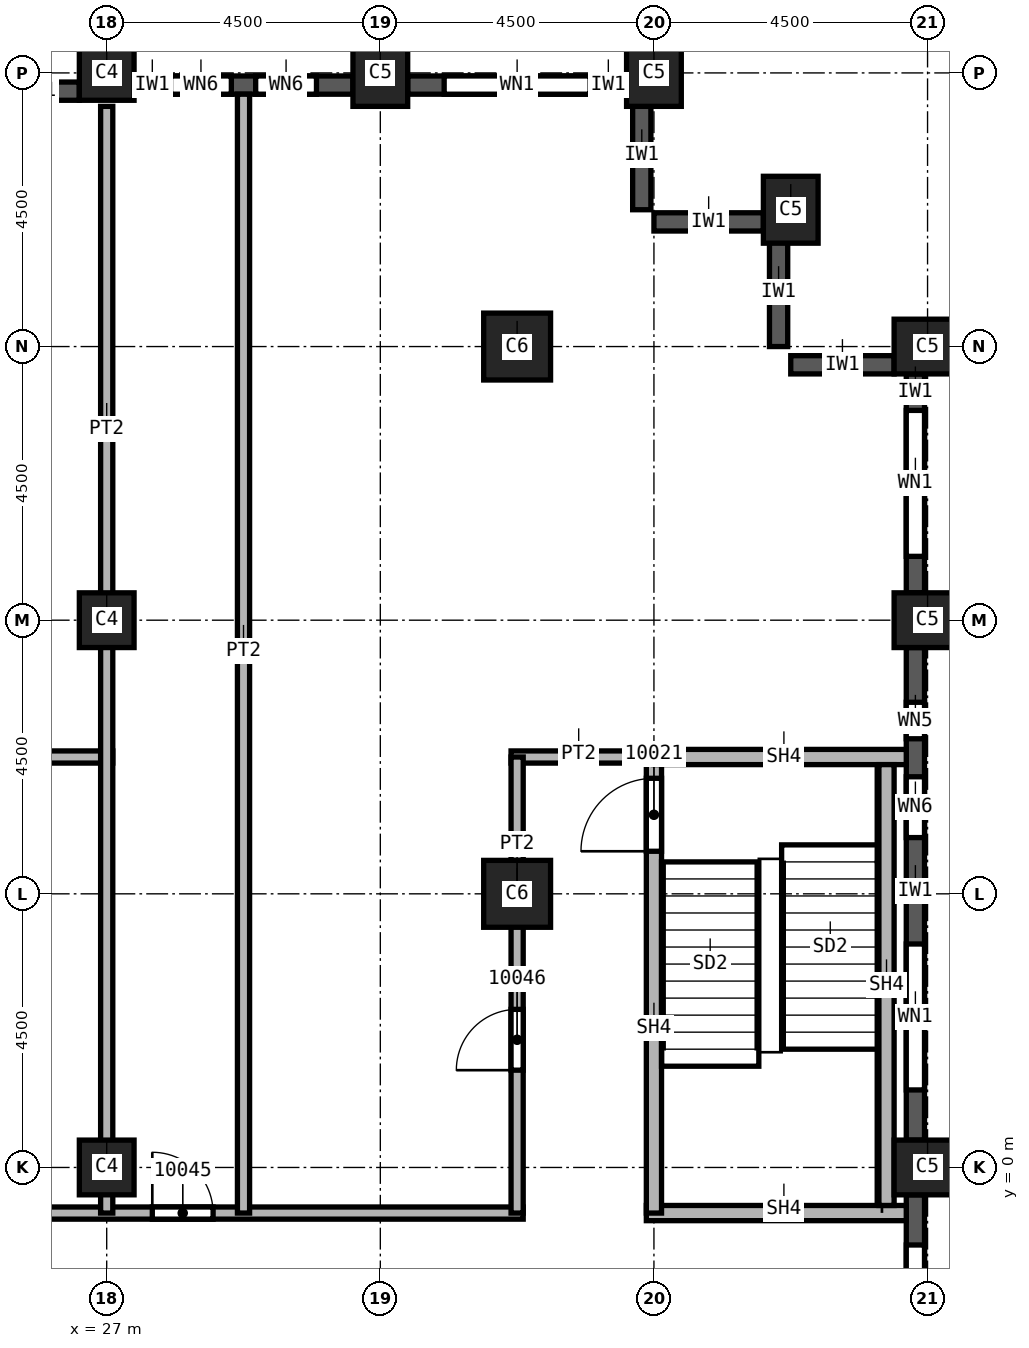
"""IFC4 building model, lengths in metres.
Left out: names, types, materials, properties, quantities, classifications, styles, units other than length and angle.
Written with IfcOpenShell. Run it as: python <this file> out.ifc"""

import sys

from ifc_helpers import new_model, si_unit, direction, frame, frame_2d, origin, origin_2d, place, context, subcontext, project, spatial, rectangle, extrude, element, fill, save


model = new_model("IFC4")
c1 = context("Model", 3, precision=1e-05, world=origin(), true_north=direction((0.0, 1.0)))
c2 = subcontext(c1, "Body", "Model", "MODEL_VIEW")
j1 = project(units=[si_unit("LENGTHUNIT", "METRE"), si_unit("PLANEANGLEUNIT", "RADIAN")], contexts=[c1])
p1 = place(None, origin())
s1 = spatial("IfcSite", under=j1, at=p1, CompositionType="ELEMENT")
p2 = place(p1, origin())
s2 = spatial("IfcBuilding", under=s1, at=p2, CompositionType="ELEMENT")
p3 = place(p2, frame((0.0, 0.0, 174.0)))
s3 = spatial("IfcBuildingStorey", under=s2, at=p3, CompositionType="ELEMENT", Elevation=174.0)
for number, where, z_axis, x_axis in (
    (1, (40.5, 0.0, 0.0), (0.0, 0.0, 1.0), (0.0, 1.0, 0.0)),
    (2, (40.5, 9.0, 0.0), (0.0, 0.0, 1.0), (0.0, 1.0, 0.0)),
    (3, (40.5, 13.5, 0.0), (0.0, 0.0, 1.0), (0.0, 1.0, 0.0)),
    (4, (38.25, 15.75, 0.0), (0.0, 0.0, 1.0), (1.0, 0.0, 0.0)),
    (5, (31.5, 18.0, 0.0), (0.0, 0.0, 1.0), (1.0, 0.0, 0.0)),
    (6, (36.0, 18.0, 0.0), (0.0, 0.0, 1.0), (1.0, 0.0, 0.0)),
):
    element("IfcColumn", number, at=place(p3, frame(where, z_axis=z_axis, x_axis=x_axis)), inside=s3, PredefinedType="COLUMN", context=c2, shape_type="SweptSolid", body=[
        extrude(rectangle(XDim=0.9, YDim=1.1, at=origin_2d()), origin(), (0.0, 0.0, 1.0), 3.59),
    ])
for number, where, z_axis, x_axis in (
    (7, (33.75, 4.5, 0.0), (0.0, 0.0, 1.0), (1.0, 0.0, 0.0)),
    (8, (33.75, 13.5, 0.0), (0.0, 0.0, 1.0), (1.0, 0.0, 0.0)),
):
    element("IfcColumn", number, at=place(p3, frame(where, z_axis=z_axis, x_axis=x_axis)), inside=s3, PredefinedType="COLUMN", context=c2, shape_type="SweptSolid", body=[
        extrude(rectangle(XDim=1.1, YDim=1.1, at=origin_2d()), origin(), (0.0, 0.0, 1.0), 3.59),
    ])
for number, where, z_axis, x_axis in (
    (9, (27.0, 0.0, 0.0), (0.0, 0.0, 1.0), (1.0, 0.0, 0.0)),
    (10, (27.0, 9.0, 0.0), (0.0, 0.0, 1.0), (1.0, 0.0, 0.0)),
    (11, (27.0, 18.0, 0.0), (0.0, 0.0, 1.0), (1.0, 0.0, 0.0)),
):
    element("IfcColumn", number, at=place(p3, frame(where, z_axis=z_axis, x_axis=x_axis)), inside=s3, PredefinedType="COLUMN", context=c2, shape_type="SweptSolid", body=[
        extrude(rectangle(XDim=0.9, YDim=0.9, at=origin_2d()), origin(), (0.0, 0.0, 1.0), 3.59),
    ])
p4 = place(p3, frame((39.95, 13.2, 0.0), z_axis=(0.0, 0.0, 1.0), x_axis=(-1.0, 0.0, 0.0)))
e12 = element("IfcWall", 12, at=p4, inside=s3, PredefinedType="SOLIDWALL", context=c2, shape_type="SweptSolid", body=[
    extrude(rectangle(XDim=1.7, YDim=0.3, at=frame_2d((0.85, 0.0))), origin(), (0.0, 0.0, 1.0), 2.99),
])
for number, where, z_axis, x_axis in (
    (13, (38.05, 15.3, 0.0), (0.0, 0.0, 1.0), (0.0, -1.0, 0.0)),
    (14, (37.8, 15.55, 0.0), (0.0, 0.0, 1.0), (-1.0, 0.0, 0.0)),
    (15, (35.8, 17.55, 0.0), (0.0, 0.0, 1.0), (0.0, -1.0, 0.0)),
):
    element("IfcWall", number, at=place(p3, frame(where, z_axis=z_axis, x_axis=x_axis)), inside=s3, PredefinedType="SOLIDWALL", context=c2, shape_type="SweptSolid", body=[
        extrude(rectangle(XDim=1.8, YDim=0.3, at=frame_2d((0.9, 0.0))), origin(), (0.0, 0.0, 1.0), 2.99),
    ])
p5 = place(p3, frame((40.3, -8.55, 0.0), z_axis=(0.0, 0.0, 1.0), x_axis=(0.0, 1.0, 0.0)))
e16 = element("IfcWall", 16, at=p5, inside=s3, PredefinedType="SOLIDWALL", context=c2, shape_type="SweptSolid", body=[
    extrude(rectangle(XDim=8.1, YDim=0.3, at=frame_2d((4.05, 0.0))), origin(), (0.0, 0.0, 1.0), 2.99),
])
p6 = place(p5, frame((0.825, 0.0, 0.8)))
e17 = element("IfcOpeningElement", 17, at=p6, cuts=e16, PredefinedType="OPENING", context=c2, shape_type="SweptSolid", body=[
    extrude(rectangle(XDim=2.4, YDim=1.95, at=frame_2d((1.2, 0.975))), frame((0.0, 0.15, 0.0), z_axis=(0.0, -1.0, 0.0), x_axis=(1.0, 0.0, 0.0)), (0.0, 0.0, 1.0), 0.3),
])
p7 = place(p5, frame((4.875, 0.0, 0.8)))
e18 = element("IfcOpeningElement", 18, at=p7, cuts=e16, PredefinedType="OPENING", context=c2, shape_type="SweptSolid", body=[
    extrude(rectangle(XDim=2.4, YDim=1.95, at=frame_2d((1.2, 0.975))), frame((0.0, 0.15, 0.0), z_axis=(0.0, -1.0, 0.0), x_axis=(1.0, 0.0, 0.0)), (0.0, 0.0, 1.0), 0.3),
])
p8 = place(p3, frame((40.3, 0.45, 0.0), z_axis=(0.0, 0.0, 1.0), x_axis=(0.0, 1.0, 0.0)))
e19 = element("IfcWall", 19, at=p8, inside=s3, PredefinedType="SOLIDWALL", context=c2, shape_type="SweptSolid", body=[
    extrude(rectangle(XDim=8.1, YDim=0.3, at=frame_2d((4.05, 0.0))), origin(), (0.0, 0.0, 1.0), 2.99),
])
p9 = place(p8, frame((0.825, 0.0, 0.8)))
e20 = element("IfcOpeningElement", 20, at=p9, cuts=e19, PredefinedType="OPENING", context=c2, shape_type="SweptSolid", body=[
    extrude(rectangle(XDim=2.4, YDim=1.95, at=frame_2d((1.2, 0.975))), frame((0.0, 0.15, 0.0), z_axis=(0.0, -1.0, 0.0), x_axis=(1.0, 0.0, 0.0)), (0.0, 0.0, 1.0), 0.3),
])
p10 = place(p8, frame((4.975, 0.0, 0.8)))
e21 = element("IfcOpeningElement", 21, at=p10, cuts=e19, PredefinedType="OPENING", context=c2, shape_type="SweptSolid", body=[
    extrude(rectangle(XDim=1.0, YDim=1.95, at=frame_2d((0.5, 0.975))), frame((0.0, 0.15, 0.0), z_axis=(0.0, -1.0, 0.0), x_axis=(1.0, 0.0, 0.0)), (0.0, 0.0, 1.0), 0.3),
])
p11 = place(p8, frame((6.6, 0.0, 0.8)))
e22 = element("IfcOpeningElement", 22, at=p11, cuts=e19, PredefinedType="OPENING", context=c2, shape_type="SweptSolid", body=[
    extrude(rectangle(XDim=0.6, YDim=1.95, at=frame_2d((0.3, 0.975))), frame((0.0, 0.15, 0.0), z_axis=(0.0, -1.0, 0.0), x_axis=(1.0, 0.0, 0.0)), (0.0, 0.0, 1.0), 0.3),
])
p12 = place(p3, frame((40.3, 9.45, 0.0), z_axis=(0.0, 0.0, 1.0), x_axis=(0.0, 1.0, 0.0)))
e23 = element("IfcWall", 23, at=p12, inside=s3, PredefinedType="SOLIDWALL", context=c2, shape_type="SweptSolid", body=[
    extrude(rectangle(XDim=3.6, YDim=0.3, at=frame_2d((1.8, 0.0))), origin(), (0.0, 0.0, 1.0), 2.99),
])
p13 = place(p12, frame((0.6, 0.0, 0.8)))
e24 = element("IfcOpeningElement", 24, at=p13, cuts=e23, PredefinedType="OPENING", context=c2, shape_type="SweptSolid", body=[
    extrude(rectangle(XDim=2.4, YDim=1.95, at=frame_2d((1.2, 0.975))), frame((0.0, 0.15, 0.0), z_axis=(0.0, -1.0, 0.0), x_axis=(1.0, 0.0, 0.0)), (0.0, 0.0, 1.0), 0.3),
])
p14 = place(p3, frame((35.55, 17.8, 0.0), z_axis=(0.0, 0.0, 1.0), x_axis=(-1.0, 0.0, 0.0)))
e25 = element("IfcWall", 25, at=p14, inside=s3, PredefinedType="SOLIDWALL", context=c2, shape_type="SweptSolid", body=[
    extrude(rectangle(XDim=3.6, YDim=0.3, at=frame_2d((1.8, 0.0))), origin(), (0.0, 0.0, 1.0), 2.99),
])
p15 = place(p14, frame((0.6, 0.0, 0.8)))
e26 = element("IfcOpeningElement", 26, at=p15, cuts=e25, PredefinedType="OPENING", context=c2, shape_type="SweptSolid", body=[
    extrude(rectangle(XDim=2.4, YDim=1.95, at=frame_2d((1.2, 0.975))), frame((0.0, 0.15, 0.0), z_axis=(0.0, -1.0, 0.0), x_axis=(1.0, 0.0, 0.0)), (0.0, 0.0, 1.0), 0.3),
])
p16 = place(p3, frame((31.05, 17.8, 0.0), z_axis=(0.0, 0.0, 1.0), x_axis=(-1.0, 0.0, 0.0)))
e27 = element("IfcWall", 27, at=p16, inside=s3, PredefinedType="SOLIDWALL", context=c2, shape_type="SweptSolid", body=[
    extrude(rectangle(XDim=3.6, YDim=0.3, at=frame_2d((1.8, 0.0))), origin(), (0.0, 0.0, 1.0), 2.99),
])
p17 = place(p16, frame((0.6, 0.0, 0.8)))
e28 = element("IfcOpeningElement", 28, at=p17, cuts=e27, PredefinedType="OPENING", context=c2, shape_type="SweptSolid", body=[
    extrude(rectangle(XDim=1.0, YDim=1.95, at=frame_2d((0.5, 0.975))), frame((0.0, 0.15, 0.0), z_axis=(0.0, -1.0, 0.0), x_axis=(1.0, 0.0, 0.0)), (0.0, 0.0, 1.0), 0.3),
])
p18 = place(p16, frame((2.0, 0.0, 0.8)))
e29 = element("IfcOpeningElement", 29, at=p18, cuts=e27, PredefinedType="OPENING", context=c2, shape_type="SweptSolid", body=[
    extrude(rectangle(XDim=1.0, YDim=1.95, at=frame_2d((0.5, 0.975))), frame((0.0, 0.15, 0.0), z_axis=(0.0, -1.0, 0.0), x_axis=(1.0, 0.0, 0.0)), (0.0, 0.0, 1.0), 0.3),
])
p19 = place(p3, frame((26.55, 17.7, 0.0), z_axis=(0.0, 0.0, 1.0), x_axis=(-1.0, 0.0, 0.0)))
e30 = element("IfcWall", 30, at=p19, inside=s3, PredefinedType="SOLIDWALL", context=c2, shape_type="SweptSolid", body=[
    extrude(rectangle(XDim=1.35, YDim=0.3, at=frame_2d((0.675, 0.0))), origin(), (0.0, 0.0, 1.0), 2.99),
])
p20 = place(p3, frame((15.4, -0.75, 0.0), z_axis=(0.0, 0.0, 1.0), x_axis=(1.0, 0.0, 0.0)))
e31 = element("IfcWall", 31, at=p20, inside=s3, PredefinedType="PARTITIONING", context=c2, shape_type="SweptSolid", body=[
    extrude(rectangle(XDim=18.45, YDim=0.2, at=frame_2d((9.225, 0.0))), origin(), (0.0, 0.0, 1.0), 3.59),
])
p21 = place(p20, frame((2.65, 0.0, 0.0)))
e32 = element("IfcOpeningElement", 32, at=p21, cuts=e31, PredefinedType="OPENING", context=c2, shape_type="SweptSolid", body=[
    extrude(rectangle(XDim=1.0, YDim=2.1, at=frame_2d((0.5, 1.05))), frame((0.0, 0.1, 0.0), z_axis=(0.0, -1.0, 0.0), x_axis=(1.0, 0.0, 0.0)), (0.0, 0.0, 1.0), 0.2),
])
p22 = place(p20, frame((12.35, 0.0, 0.0)))
e33 = element("IfcOpeningElement", 33, at=p22, cuts=e31, PredefinedType="OPENING", context=c2, shape_type="SweptSolid", body=[
    extrude(rectangle(XDim=1.0, YDim=2.1, at=frame_2d((0.5, 1.05))), frame((0.0, 0.1, 0.0), z_axis=(0.0, -1.0, 0.0), x_axis=(1.0, 0.0, 0.0)), (0.0, 0.0, 1.0), 0.2),
])
p23 = place(p3, frame((15.4, 6.75, 0.0), z_axis=(0.0, 0.0, 1.0), x_axis=(1.0, 0.0, 0.0)))
e34 = element("IfcWall", 34, at=p23, inside=s3, PredefinedType="PARTITIONING", context=c2, shape_type="SweptSolid", body=[
    extrude(rectangle(XDim=11.7, YDim=0.2, at=frame_2d((5.85, 0.0))), origin(), (0.0, 0.0, 1.0), 3.59),
])
p24 = place(p3, frame((27.0, 17.45, 0.0), z_axis=(0.0, 0.0, 1.0), x_axis=(0.0, -1.0, 0.0)))
e35 = element("IfcWall", 35, at=p24, inside=s3, PredefinedType="PARTITIONING", context=c2, shape_type="SweptSolid", body=[
    extrude(rectangle(XDim=18.2, YDim=0.2, at=frame_2d((9.1, 0.0))), origin(), (0.0, 0.0, 1.0), 3.59),
])
p25 = place(p3, frame((29.25, 17.65, 0.0), z_axis=(0.0, 0.0, 1.0), x_axis=(0.0, -1.0, 0.0)))
e36 = element("IfcWall", 36, at=p25, inside=s3, PredefinedType="PARTITIONING", context=c2, shape_type="SweptSolid", body=[
    extrude(rectangle(XDim=18.4, YDim=0.2, at=frame_2d((9.2, 0.0))), origin(), (0.0, 0.0, 1.0), 3.59),
])
p26 = place(p3, frame((33.65, 6.75, 0.0), z_axis=(0.0, 0.0, 1.0), x_axis=(1.0, 0.0, 0.0)))
e37 = element("IfcWall", 37, at=p26, inside=s3, PredefinedType="PARTITIONING", context=c2, shape_type="SweptSolid", body=[
    extrude(rectangle(XDim=2.35, YDim=0.2, at=frame_2d((1.175, 0.0))), origin(), (0.0, 0.0, 1.0), 3.59),
])
p27 = place(p3, frame((33.75, -0.75, 0.0), z_axis=(0.0, 0.0, 1.0), x_axis=(0.0, 1.0, 0.0)))
e38 = element("IfcWall", 38, at=p27, inside=s3, PredefinedType="PARTITIONING", context=c2, shape_type="SweptSolid", body=[
    extrude(rectangle(XDim=7.5, YDim=0.2, at=frame_2d((3.75, 0.0))), origin(), (0.0, 0.0, 1.0), 3.59),
])
p28 = place(p27, frame((2.35, 0.0, 0.0)))
e39 = element("IfcOpeningElement", 39, at=p28, cuts=e38, PredefinedType="OPENING", context=c2, shape_type="SweptSolid", body=[
    extrude(rectangle(XDim=1.0, YDim=2.1, at=frame_2d((0.5, 1.05))), frame((0.0, 0.1, 0.0), z_axis=(0.0, -1.0, 0.0), x_axis=(1.0, 0.0, 0.0)), (0.0, 0.0, 1.0), 0.2),
])
p29 = place(p3, frame((35.875, -0.75, 0.0), z_axis=(0.0, 0.0, 1.0), x_axis=(1.0, 0.0, 0.0)))
e40 = element("IfcWall", 40, at=p29, inside=s3, PredefinedType="SOLIDWALL", context=c2, shape_type="SweptSolid", body=[
    extrude(rectangle(XDim=4.275, YDim=0.25, at=frame_2d((2.137, 0.0))), origin(), (0.0, 0.0, 1.0), 3.59),
])
p30 = place(p3, frame((36.0, -0.75, 0.0), z_axis=(0.0, 0.0, 1.0), x_axis=(0.0, 1.0, 0.0)))
e41 = element("IfcWall", 41, at=p30, inside=s3, PredefinedType="SOLIDWALL", context=c2, shape_type="SweptSolid", body=[
    extrude(rectangle(XDim=7.625, YDim=0.25, at=frame_2d((3.812, 0.0))), origin(), (0.0, 0.0, 1.0), 3.59),
])
p31 = place(p30, frame((5.95, 0.0, 0.0)))
e42 = element("IfcOpeningElement", 42, at=p31, cuts=e41, PredefinedType="OPENING", context=c2, shape_type="SweptSolid", body=[
    extrude(rectangle(XDim=1.2, YDim=2.1, at=frame_2d((0.6, 1.05))), frame((0.0, 0.125, 0.0), z_axis=(0.0, -1.0, 0.0), x_axis=(1.0, 0.0, 0.0)), (0.0, 0.0, 1.0), 0.25),
])
p32 = place(p3, frame((36.0, 6.75, 0.0), z_axis=(0.0, 0.0, 1.0), x_axis=(1.0, 0.0, 0.0)))
e43 = element("IfcWall", 43, at=p32, inside=s3, PredefinedType="SOLIDWALL", context=c2, shape_type="SweptSolid", body=[
    extrude(rectangle(XDim=4.15, YDim=0.25, at=frame_2d((2.075, 0.0))), origin(), (0.0, 0.0, 1.0), 3.59),
])
p33 = place(p3, frame((39.825, -0.625, 0.0), z_axis=(0.0, 0.0, 1.0), x_axis=(0.0, 1.0, 0.0)))
e44 = element("IfcWall", 44, at=p33, inside=s3, PredefinedType="SOLIDWALL", context=c2, shape_type="SweptSolid", body=[
    extrude(rectangle(XDim=7.25, YDim=0.25, at=frame_2d((3.625, 0.0))), origin(), (0.0, 0.0, 1.0), 3.59),
])
p34 = place(p7, origin())
e45 = element("IfcWindow", 45, at=p34, inside=s3, PartitioningType="SINGLE_PANEL", PredefinedType="WINDOW", context=c2, shape_type="SweptSolid", body=[
    extrude(rectangle(XDim=2.4, YDim=1.95, at=frame_2d((1.2, 0.975))), frame((0.0, 0.03, 0.0), z_axis=(0.0, -1.0, 0.0), x_axis=(1.0, 0.0, 0.0)), (0.0, 0.0, 1.0), 0.06),
])
fill(e18, e45)
p35 = place(p9, origin())
e46 = element("IfcWindow", 46, at=p35, inside=s3, PartitioningType="SINGLE_PANEL", PredefinedType="WINDOW", context=c2, shape_type="SweptSolid", body=[
    extrude(rectangle(XDim=2.4, YDim=1.95, at=frame_2d((1.2, 0.975))), frame((0.0, 0.03, 0.0), z_axis=(0.0, -1.0, 0.0), x_axis=(1.0, 0.0, 0.0)), (0.0, 0.0, 1.0), 0.06),
])
fill(e20, e46)
p36 = place(p13, origin())
e47 = element("IfcWindow", 47, at=p36, inside=s3, PartitioningType="SINGLE_PANEL", PredefinedType="WINDOW", context=c2, shape_type="SweptSolid", body=[
    extrude(rectangle(XDim=2.4, YDim=1.95, at=frame_2d((1.2, 0.975))), frame((0.0, 0.03, 0.0), z_axis=(0.0, -1.0, 0.0), x_axis=(1.0, 0.0, 0.0)), (0.0, 0.0, 1.0), 0.06),
])
fill(e24, e47)
p37 = place(p15, origin())
e48 = element("IfcWindow", 48, at=p37, inside=s3, PartitioningType="SINGLE_PANEL", PredefinedType="WINDOW", context=c2, shape_type="SweptSolid", body=[
    extrude(rectangle(XDim=2.4, YDim=1.95, at=frame_2d((1.2, 0.975))), frame((0.0, 0.03, 0.0), z_axis=(0.0, -1.0, 0.0), x_axis=(1.0, 0.0, 0.0)), (0.0, 0.0, 1.0), 0.06),
])
fill(e26, e48)
p38 = place(p31, origin())
e49 = element("IfcDoor", 49, at=p38, inside=s3, OperationType="SINGLE_SWING_RIGHT", PredefinedType="DOOR", context=c2, shape_type="SweptSolid", body=[
    extrude(rectangle(XDim=1.2, YDim=2.1, at=frame_2d((0.6, 1.05))), frame((0.0, 0.025, 0.0), z_axis=(0.0, -1.0, 0.0), x_axis=(1.0, 0.0, 0.0)), (0.0, 0.0, 1.0), 0.05),
])
fill(e42, e49)
p39 = place(p22, origin())
e50 = element("IfcDoor", 50, at=p39, inside=s3, OperationType="SINGLE_SWING_RIGHT", PredefinedType="DOOR", context=c2, shape_type="SweptSolid", body=[
    extrude(rectangle(XDim=1.0, YDim=2.1, at=frame_2d((0.5, 1.05))), frame((0.0, 0.025, 0.0), z_axis=(0.0, -1.0, 0.0), x_axis=(1.0, 0.0, 0.0)), (0.0, 0.0, 1.0), 0.05),
])
fill(e33, e50)
p40 = place(p28, origin())
e51 = element("IfcDoor", 51, at=p40, inside=s3, OperationType="SINGLE_SWING_LEFT", PredefinedType="DOOR", context=c2, shape_type="SweptSolid", body=[
    extrude(rectangle(XDim=1.0, YDim=2.1, at=frame_2d((0.5, 1.05))), frame((0.0, 0.025, 0.0), z_axis=(0.0, -1.0, 0.0), x_axis=(1.0, 0.0, 0.0)), (0.0, 0.0, 1.0), 0.05),
])
fill(e39, e51)
p41 = place(p10, origin())
e52 = element("IfcWindow", 52, at=p41, inside=s3, PartitioningType="SINGLE_PANEL", PredefinedType="WINDOW", context=c2, shape_type="SweptSolid", body=[
    extrude(rectangle(XDim=1.0, YDim=1.95, at=frame_2d((0.5, 0.975))), frame((0.0, 0.03, 0.0), z_axis=(0.0, -1.0, 0.0), x_axis=(1.0, 0.0, 0.0)), (0.0, 0.0, 1.0), 0.06),
])
fill(e21, e52)
p42 = place(p11, origin())
e53 = element("IfcWindow", 53, at=p42, inside=s3, PartitioningType="SINGLE_PANEL", PredefinedType="WINDOW", context=c2, shape_type="SweptSolid", body=[
    extrude(rectangle(XDim=0.6, YDim=1.95, at=frame_2d((0.3, 0.975))), frame((0.0, 0.03, 0.0), z_axis=(0.0, -1.0, 0.0), x_axis=(1.0, 0.0, 0.0)), (0.0, 0.0, 1.0), 0.06),
])
fill(e22, e53)
p43 = place(p17, origin())
e54 = element("IfcWindow", 54, at=p43, inside=s3, PartitioningType="SINGLE_PANEL", PredefinedType="WINDOW", context=c2, shape_type="SweptSolid", body=[
    extrude(rectangle(XDim=1.0, YDim=1.95, at=frame_2d((0.5, 0.975))), frame((0.0, 0.03, 0.0), z_axis=(0.0, -1.0, 0.0), x_axis=(1.0, 0.0, 0.0)), (0.0, 0.0, 1.0), 0.06),
])
fill(e28, e54)
p44 = place(p18, origin())
e55 = element("IfcWindow", 55, at=p44, inside=s3, PartitioningType="SINGLE_PANEL", PredefinedType="WINDOW", context=c2, shape_type="SweptSolid", body=[
    extrude(rectangle(XDim=1.0, YDim=1.95, at=frame_2d((0.5, 0.975))), frame((0.0, 0.03, 0.0), z_axis=(0.0, -1.0, 0.0), x_axis=(1.0, 0.0, 0.0)), (0.0, 0.0, 1.0), 0.06),
])
fill(e29, e55)
save(model, sys.argv[1])
